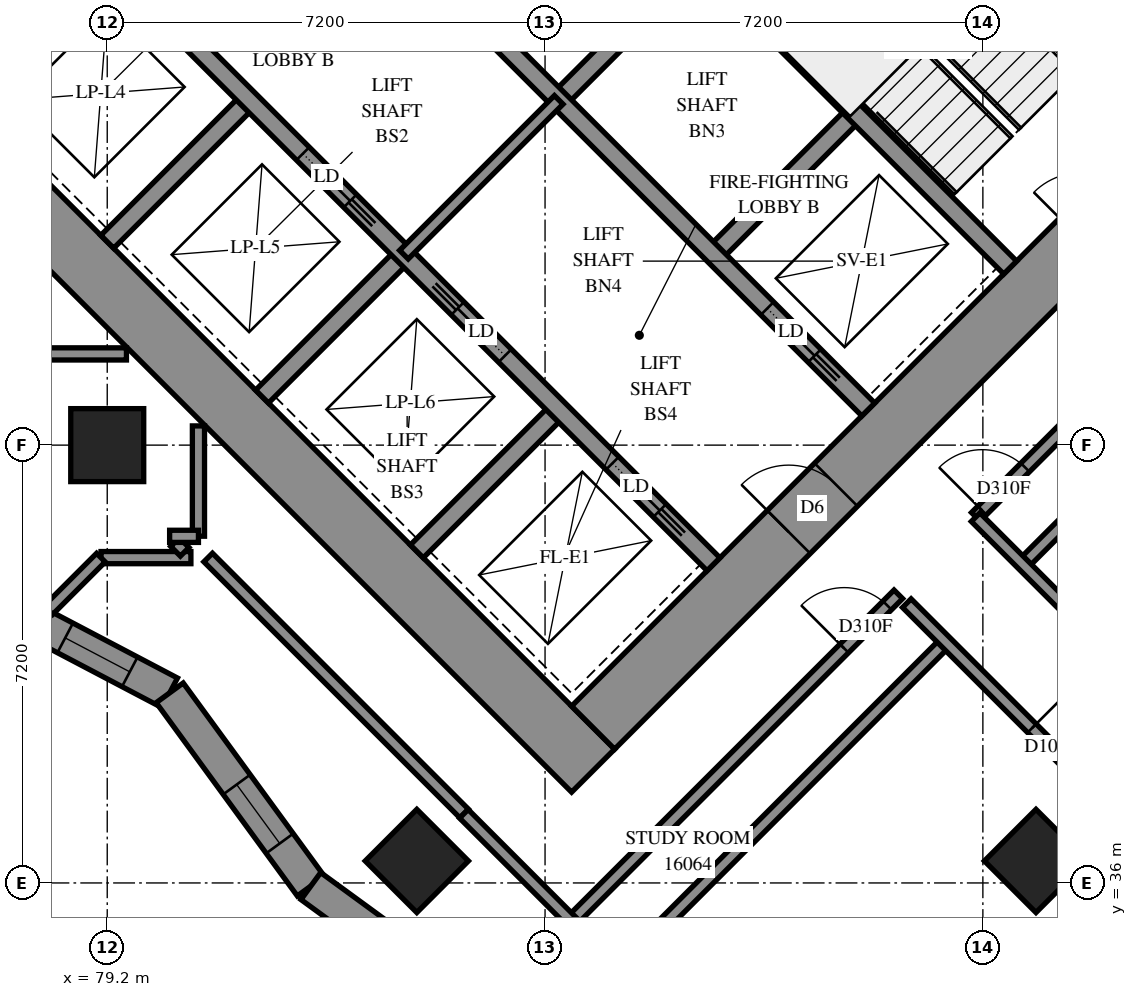
"""IFC4 building model, lengths in metres.
Left out: names, types, materials, properties, quantities, classifications, styles, units other than length and angle.
Written with IfcOpenShell. Run it as: python <this file> out.ifc"""

import sys

from ifc_helpers import new_model, si_unit, direction, frame, frame_2d, origin, origin_2d, place, context, subcontext, project, spatial, polyline, rectangle, outline, extrude, element, fill, save


model = new_model("IFC4")
c1 = context("Model", 3, precision=1e-05, world=origin(), true_north=direction((0.0, 1.0)))
c2 = subcontext(c1, "Body", "Model", "MODEL_VIEW")
j1 = project(units=[si_unit("LENGTHUNIT", "METRE"), si_unit("PLANEANGLEUNIT", "RADIAN")], contexts=[c1])
p1 = place(None, origin())
s1 = spatial("IfcSite", under=j1, at=p1, CompositionType="ELEMENT")
p2 = place(p1, origin())
s2 = spatial("IfcBuilding", under=s1, at=p2, CompositionType="ELEMENT")
p3 = place(p2, frame((0.0, 0.0, 61.0)))
s3 = spatial("IfcBuildingStorey", under=s2, at=p3, CompositionType="ELEMENT", Elevation=61.0)
for number, where, z_axis, x_axis in (
    (1, (79.2, 43.2, 0.0), (0.0, 0.0, 1.0), (1.0, 0.0, 0.0)),
    (2, (84.291, 36.362, 0.0), (0.0, 0.0, 1.0), (0.707, -0.707, 0.0)),
    (3, (94.474, 36.362, 0.0), (0.0, 0.0, 1.0), (0.707, -0.707, 0.0)),
):
    element("IfcColumn", number, at=place(p3, frame(where, z_axis=z_axis, x_axis=x_axis)), inside=s3, PredefinedType="COLUMN", context=c2, shape_type="SweptSolid", body=[
        extrude(rectangle(XDim=1.2, YDim=1.2, at=origin_2d()), origin(), (0.0, 0.0, 1.0), 3.1),
    ])
p4 = place(p3, frame((75.594, 49.443, -0.3), z_axis=(0.0, 0.0, 1.0), x_axis=(0.7071037324, -0.70710983, 0.0)))
e4 = element("IfcWall", 4, at=p4, inside=s3, PredefinedType="SHEAR", context=c2, shape_type="SweptSolid", body=[
    extrude(rectangle(XDim=16.4, YDim=1.0, at=frame_2d((8.2, 0.0))), origin(), (0.0, 0.0, 1.0), 2.7),
])
p5 = place(p3, frame((86.483, 60.333, -0.3), z_axis=(0.0, 0.0, 1.0), x_axis=(0.70710983, -0.7071037324, 0.0)))
e5 = element("IfcWall", 5, at=p5, inside=s3, PredefinedType="SHEAR", context=c2, shape_type="SweptSolid", body=[
    extrude(rectangle(XDim=16.4, YDim=1.0, at=frame_2d((8.2, 0.0))), origin(), (0.0, 0.0, 1.0), 2.7),
])
p6 = place(p5, frame((11.0, 0.0, 0.3)))
e6 = element("IfcOpeningElement", 6, at=p6, cuts=e5, PredefinedType="OPENING", context=c2, shape_type="SweptSolid", body=[
    extrude(rectangle(XDim=0.8, YDim=2.1, at=frame_2d((0.4, 1.05))), frame((0.0, 0.51, 0.0), z_axis=(0.0, -1.0, 0.0), x_axis=(1.0, 0.0, 0.0)), (0.0, 0.0, 1.0), 1.02),
])
p7 = place(p3, frame((76.301, 49.443, -0.3), z_axis=(0.0, 0.0, 1.0), x_axis=(0.7071067812, 0.7071067812, 0.0)))
e7 = element("IfcWall", 7, at=p7, inside=s3, PredefinedType="SHEAR", context=c2, shape_type="SweptSolid", body=[
    extrude(rectangle(XDim=14.4, YDim=1.0, at=frame_2d((7.2, 0.0))), origin(), (0.0, 0.0, 1.0), 2.7),
])
p8 = place(p7, frame((4.55, 0.0, 0.3)))
e8 = element("IfcOpeningElement", 8, at=p8, cuts=e7, PredefinedType="OPENING", context=c2, shape_type="SweptSolid", body=[
    extrude(rectangle(XDim=1.1, YDim=2.1, at=frame_2d((0.55, 1.05))), frame((0.0, 0.51, 0.0), z_axis=(0.0, -1.0, 0.0), x_axis=(1.0, 0.0, 0.0)), (0.0, 0.0, 1.0), 1.02),
])
p9 = place(p7, frame((11.35, 0.0, 0.3)))
e9 = element("IfcOpeningElement", 9, at=p9, cuts=e7, PredefinedType="OPENING", context=c2, shape_type="SweptSolid", body=[
    extrude(rectangle(XDim=1.1, YDim=2.1, at=frame_2d((0.55, 1.05))), frame((0.0, 0.51, 0.0), z_axis=(0.0, -1.0, 0.0), x_axis=(1.0, 0.0, 0.0)), (0.0, 0.0, 1.0), 1.02),
])
p10 = place(p3, frame((87.19, 38.554, -0.3), z_axis=(0.0, 0.0, 1.0), x_axis=(0.707103309, 0.7071102534, 0.0)))
e10 = element("IfcWall", 10, at=p10, inside=s3, PredefinedType="SHEAR", context=c2, shape_type="SweptSolid", body=[
    extrude(rectangle(XDim=14.4, YDim=1.0, at=frame_2d((7.2, 0.0))), origin(), (0.0, 0.0, 1.0), 2.7),
])
p11 = place(p10, frame((4.55, 0.0, 0.3)))
e11 = element("IfcOpeningElement", 11, at=p11, cuts=e10, PredefinedType="OPENING", context=c2, shape_type="SweptSolid", body=[
    extrude(rectangle(XDim=1.1, YDim=2.1, at=frame_2d((0.55, 1.05))), frame((0.0, 0.51, 0.0), z_axis=(0.0, -1.0, 0.0), x_axis=(1.0, 0.0, 0.0)), (0.0, 0.0, 1.0), 1.02),
])
p12 = place(p10, frame((11.35, 0.0, 0.3)))
e12 = element("IfcOpeningElement", 12, at=p12, cuts=e10, PredefinedType="OPENING", context=c2, shape_type="SweptSolid", body=[
    extrude(rectangle(XDim=1.1, YDim=2.1, at=frame_2d((0.55, 1.05))), frame((0.0, 0.51, 0.0), z_axis=(0.0, -1.0, 0.0), x_axis=(1.0, 0.0, 0.0)), (0.0, 0.0, 1.0), 1.02),
])
p13 = place(p3, frame((79.2, 46.544, 0.0), z_axis=(0.0, 0.0, 1.0), x_axis=(0.7071219326, 0.7070916295, 0.0)))
e13 = element("IfcWall", 13, at=p13, inside=s3, PredefinedType="SOLIDWALL", context=c2, shape_type="SweptSolid", body=[
    extrude(rectangle(XDim=3.3, YDim=0.3, at=frame_2d((1.65, 0.0))), origin(), (0.0, 0.0, 1.0), 3.1),
])
p14 = place(p3, frame((81.746, 43.999, 0.0), z_axis=(0.0, 0.0, 1.0), x_axis=(0.7071067812, 0.7071067812, 0.0)))
e14 = element("IfcWall", 14, at=p14, inside=s3, PredefinedType="SOLIDWALL", context=c2, shape_type="SweptSolid", body=[
    extrude(rectangle(XDim=3.3, YDim=0.3, at=frame_2d((1.65, 0.0))), origin(), (0.0, 0.0, 1.0), 3.1),
])
p15 = place(p3, frame((86.625, 48.878, 0.0), z_axis=(0.0, 0.0, 1.0), x_axis=(0.7071067812, 0.7071067812, 0.0)))
e15 = element("IfcWall", 15, at=p15, inside=s3, PredefinedType="SOLIDWALL", context=c2, shape_type="SweptSolid", body=[
    extrude(rectangle(XDim=3.3, YDim=0.3, at=frame_2d((1.65, 0.0))), origin(), (0.0, 0.0, 1.0), 3.1),
])
p16 = place(p3, frame((84.291, 41.453, 0.0), z_axis=(0.0, 0.0, 1.0), x_axis=(0.7071067812, 0.7071067812, 0.0)))
e16 = element("IfcWall", 16, at=p16, inside=s3, PredefinedType="SOLIDWALL", context=c2, shape_type="SweptSolid", body=[
    extrude(rectangle(XDim=3.3, YDim=0.3, at=frame_2d((1.65, 0.0))), origin(), (0.0, 0.0, 1.0), 3.1),
])
p17 = place(p3, frame((89.17, 46.332, 0.0), z_axis=(0.0, 0.0, 1.0), x_axis=(0.7071067812, 0.7071067812, 0.0)))
e17 = element("IfcWall", 17, at=p17, inside=s3, PredefinedType="SOLIDWALL", context=c2, shape_type="SweptSolid", body=[
    extrude(rectangle(XDim=3.3, YDim=0.3, at=frame_2d((1.65, 0.0))), origin(), (0.0, 0.0, 1.0), 3.1),
])
p18 = place(p3, frame((78.988, 51.423, 0.0), z_axis=(0.0, 0.0, 1.0), x_axis=(0.7071067812, -0.7071067812, 0.0)))
e18 = element("IfcWall", 18, at=p18, inside=s3, PredefinedType="SOLIDWALL", context=c2, shape_type="SweptSolid", body=[
    extrude(rectangle(XDim=14.4, YDim=0.3, at=frame_2d((7.2, 0.0))), origin(), (0.0, 0.0, 1.0), 3.1),
])
p19 = place(p18, frame((1.25, 0.0, 0.0)))
e19 = element("IfcOpeningElement", 19, at=p19, cuts=e18, PredefinedType="OPENING", context=c2, shape_type="SweptSolid", body=[
    extrude(rectangle(XDim=1.1, YDim=2.1, at=frame_2d((0.55, 1.05))), frame((0.0, 0.16, 0.0), z_axis=(0.0, -1.0, 0.0), x_axis=(1.0, 0.0, 0.0)), (0.0, 0.0, 1.0), 0.32),
])
p20 = place(p18, frame((4.85, 0.0, 0.0)))
e20 = element("IfcOpeningElement", 20, at=p20, cuts=e18, PredefinedType="OPENING", context=c2, shape_type="SweptSolid", body=[
    extrude(rectangle(XDim=1.1, YDim=2.1, at=frame_2d((0.55, 1.05))), frame((0.0, 0.16, 0.0), z_axis=(0.0, -1.0, 0.0), x_axis=(1.0, 0.0, 0.0)), (0.0, 0.0, 1.0), 0.32),
])
p21 = place(p18, frame((8.45, 0.0, 0.0)))
e21 = element("IfcOpeningElement", 21, at=p21, cuts=e18, PredefinedType="OPENING", context=c2, shape_type="SweptSolid", body=[
    extrude(rectangle(XDim=1.1, YDim=2.1, at=frame_2d((0.55, 1.05))), frame((0.0, 0.16, 0.0), z_axis=(0.0, -1.0, 0.0), x_axis=(1.0, 0.0, 0.0)), (0.0, 0.0, 1.0), 0.32),
])
p22 = place(p18, frame((12.05, 0.0, 0.0)))
e22 = element("IfcOpeningElement", 22, at=p22, cuts=e18, PredefinedType="OPENING", context=c2, shape_type="SweptSolid", body=[
    extrude(rectangle(XDim=1.1, YDim=2.1, at=frame_2d((0.55, 1.05))), frame((0.0, 0.16, 0.0), z_axis=(0.0, -1.0, 0.0), x_axis=(1.0, 0.0, 0.0)), (0.0, 0.0, 1.0), 0.32),
])
p23 = place(p3, frame((81.534, 53.969, 0.0), z_axis=(0.0, 0.0, 1.0), x_axis=(0.707103309, -0.7071102534, 0.0)))
e23 = element("IfcWall", 23, at=p23, inside=s3, PredefinedType="SOLIDWALL", context=c2, shape_type="SweptSolid", body=[
    extrude(rectangle(XDim=14.4, YDim=0.3, at=frame_2d((7.2, 0.0))), origin(), (0.0, 0.0, 1.0), 3.1),
])
p24 = place(p23, frame((12.05, 0.0, 0.0)))
e24 = element("IfcOpeningElement", 24, at=p24, cuts=e23, PredefinedType="OPENING", context=c2, shape_type="SweptSolid", body=[
    extrude(rectangle(XDim=1.1, YDim=2.1, at=frame_2d((0.55, 1.05))), frame((0.0, 0.16, 0.0), z_axis=(0.0, -1.0, 0.0), x_axis=(1.0, 0.0, 0.0)), (0.0, 0.0, 1.0), 0.32),
])
p25 = place(p3, frame((88.958, 51.211, 0.0), z_axis=(0.0, 0.0, 1.0), x_axis=(0.7070998367, -0.7071137256, 0.0)))
e25 = element("IfcWall", 25, at=p25, inside=s3, PredefinedType="SOLIDWALL", context=c2, shape_type="SweptSolid", body=[
    extrude(rectangle(XDim=7.2, YDim=0.3, at=frame_2d((3.6, 0.0))), origin(), (0.0, 0.0, 1.0), 3.1),
])
p26 = place(p3, frame((76.568, 41.05, 0.0), z_axis=(0.0, 0.0, 1.0), x_axis=(0.8852124117, -0.4651870444, 0.0)))
e26 = element("IfcWall", 26, at=p26, inside=s3, PredefinedType="SOLIDWALL", context=c2, shape_type="SweptSolid", body=[
    extrude(outline(polyline([(0.02, -0.275), (4.07, -0.275), (4.198, 0.275), (-0.02, 0.275), (0.02, -0.275)])), origin(), (0.0, 0.0, 1.0), 3.1),
])
p27 = place(p26, frame((0.325, 0.0, 0.5)))
e27 = element("IfcOpeningElement", 27, at=p27, cuts=e26, PredefinedType="OPENING", context=c2, shape_type="SweptSolid", body=[
    extrude(rectangle(XDim=1.2, YDim=2.45, at=frame_2d((0.6, 1.225))), frame((0.0, 0.285, 0.0), z_axis=(0.0, -1.0, 0.0), x_axis=(1.0, 0.0, 0.0)), (0.0, 0.0, 1.0), 0.57),
])
p28 = place(p26, frame((2.192, 0.0, 0.5)))
e28 = element("IfcOpeningElement", 28, at=p28, cuts=e26, PredefinedType="OPENING", context=c2, shape_type="SweptSolid", body=[
    extrude(rectangle(XDim=1.2, YDim=2.45, at=frame_2d((0.6, 1.225))), frame((0.0, 0.285, 0.0), z_axis=(0.0, -1.0, 0.0), x_axis=(1.0, 0.0, 0.0)), (0.0, 0.0, 1.0), 0.57),
])
p29 = place(p3, frame((80.227, 39.127, 0.0), z_axis=(0.0, 0.0, 1.0), x_axis=(0.5897540607, -0.8075829046, 0.0)))
e29 = element("IfcWall", 29, at=p29, inside=s3, PredefinedType="SOLIDWALL", context=c2, shape_type="SweptSolid", body=[
    extrude(outline(polyline([(0.064, -0.275), (3.978, -0.275), (3.892, 0.275), (-0.064, 0.275), (0.064, -0.275)])), origin(), (0.0, 0.0, 1.0), 3.1),
])
p30 = place(p29, frame((1.868, 0.0, 0.5)))
e30 = element("IfcOpeningElement", 30, at=p30, cuts=e29, PredefinedType="OPENING", context=c2, shape_type="SweptSolid", body=[
    extrude(rectangle(XDim=1.2, YDim=2.45, at=frame_2d((0.6, 1.225))), frame((0.0, 0.285, 0.0), z_axis=(0.0, -1.0, 0.0), x_axis=(1.0, 0.0, 0.0)), (0.0, 0.0, 1.0), 0.57),
])
p31 = place(p3, frame((82.548, 35.949, 0.0), z_axis=(0.0, 0.0, 1.0), x_axis=(0.8075900138, -0.5897443257, 0.0)))
e31 = element("IfcWall", 31, at=p31, inside=s3, PredefinedType="SOLIDWALL", context=c2, shape_type="SweptSolid", body=[
    extrude(outline(polyline([(-0.043, -0.275), (3.871, -0.275), (3.957, 0.275), (0.043, 0.275), (-0.043, -0.275)])), origin(), (0.0, 0.0, 1.0), 3.1),
])
p32 = place(p31, frame((1.733, 0.0, 0.5)))
e32 = element("IfcOpeningElement", 32, at=p32, cuts=e31, PredefinedType="OPENING", context=c2, shape_type="SweptSolid", body=[
    extrude(rectangle(XDim=1.2, YDim=2.45, at=frame_2d((0.6, 1.225))), frame((0.0, 0.285, 0.0), z_axis=(0.0, -1.0, 0.0), x_axis=(1.0, 0.0, 0.0)), (0.0, 0.0, 1.0), 0.57),
])
p33 = place(p3, frame((91.313, 53.354, 0.0), z_axis=(0.0, 0.0, 1.0), x_axis=(0.7071067812, -0.7071067812, 0.0)))
e33 = element("IfcWall", 33, at=p33, inside=s3, PredefinedType="PARTITIONING", context=c2, shape_type="SweptSolid", body=[
    extrude(rectangle(XDim=5.65, YDim=0.15, at=frame_2d((2.825, 0.0))), origin(), (0.0, 0.0, 1.0), 3.1),
])
p34 = place(p3, frame((84.079, 46.332, 0.0), z_axis=(0.0, 0.0, 1.0), x_axis=(0.7071067812, 0.7071067812, 0.0)))
e34 = element("IfcWall", 34, at=p34, inside=s3, PredefinedType="PARTITIONING", context=c2, shape_type="SweptSolid", body=[
    extrude(rectangle(XDim=3.6, YDim=0.2, at=frame_2d((1.8, 0.0))), origin(), (0.0, 0.0, 1.0), 3.1),
])
p35 = place(p3, frame((94.259, 41.243, 0.0), z_axis=(0.0, 0.0, 1.0), x_axis=(0.7070205168, 0.707193035, 0.0)))
e35 = element("IfcWall", 35, at=p35, inside=s3, PredefinedType="PARTITIONING", context=c2, shape_type="SweptSolid", body=[
    extrude(rectangle(XDim=12.173, YDim=0.2, at=frame_2d((6.086, 0.0))), origin(), (0.0, 0.0, 1.0), 3.1),
])
p36 = place(p3, frame((93.484, 42.02, 0.0), z_axis=(0.0, 0.0, 1.0), x_axis=(0.7071067812, 0.7071067812, 0.0)))
e36 = element("IfcWall", 36, at=p36, inside=s3, PredefinedType="PARTITIONING", context=c2, shape_type="SweptSolid", body=[
    extrude(rectangle(XDim=9.998, YDim=0.2, at=frame_2d((4.999, 0.0))), origin(), (0.0, 0.0, 1.0), 3.1),
])
p37 = place(p36, frame((0.148, 0.0, 0.0)))
e37 = element("IfcOpeningElement", 37, at=p37, cuts=e36, PredefinedType="OPENING", context=c2, shape_type="SweptSolid", body=[
    extrude(rectangle(XDim=1.0, YDim=2.1, at=frame_2d((0.5, 1.05))), frame((0.0, 0.11, 0.0), z_axis=(0.0, -1.0, 0.0), x_axis=(1.0, 0.0, 0.0)), (0.0, 0.0, 1.0), 0.22),
])
p38 = place(p3, frame((86.311, 33.282, 0.0), z_axis=(0.0, 0.0, 1.0), x_axis=(0.7069956462, 0.7072178987, 0.0)))
e38 = element("IfcWall", 38, at=p38, inside=s3, PredefinedType="PARTITIONING", context=c2, shape_type="SweptSolid", body=[
    extrude(rectangle(XDim=9.449, YDim=0.2, at=frame_2d((4.724, 0.0))), origin(), (0.0, 0.0, 1.0), 3.1),
])
p39 = place(p3, frame((92.349, 40.601, 0.0), z_axis=(0.0, 0.0, 1.0), x_axis=(0.7071067812, -0.7071067812, 0.0)))
e39 = element("IfcWall", 39, at=p39, inside=s3, PredefinedType="PARTITIONING", context=c2, shape_type="SweptSolid", body=[
    extrude(rectangle(XDim=8.101, YDim=0.2, at=frame_2d((4.05, 0.0))), origin(), (0.0, 0.0, 1.0), 3.1),
])
p40 = place(p39, frame((2.909, 0.0, 0.0)))
e40 = element("IfcOpeningElement", 40, at=p40, cuts=e39, PredefinedType="OPENING", context=c2, shape_type="SweptSolid", body=[
    extrude(rectangle(XDim=0.9, YDim=2.1, at=frame_2d((0.45, 1.05))), frame((0.0, 0.11, 0.0), z_axis=(0.0, -1.0, 0.0), x_axis=(1.0, 0.0, 0.0)), (0.0, 0.0, 1.0), 0.22),
])
p41 = place(p3, frame((86.836, 35.372, 0.0), z_axis=(0.0, 0.0, 1.0), x_axis=(0.7071067812, 0.7071067812, 0.0)))
e41 = element("IfcWall", 41, at=p41, inside=s3, PredefinedType="PARTITIONING", context=c2, shape_type="SweptSolid", body=[
    extrude(rectangle(XDim=7.6, YDim=0.2, at=frame_2d((3.8, 0.0))), origin(), (0.0, 0.0, 1.0), 3.1),
])
p42 = place(p41, frame((6.342, 0.0, 0.0)))
e42 = element("IfcOpeningElement", 42, at=p42, cuts=e41, PredefinedType="OPENING", context=c2, shape_type="SweptSolid", body=[
    extrude(rectangle(XDim=1.0, YDim=2.1, at=frame_2d((0.5, 1.05))), frame((0.0, 0.11, 0.0), z_axis=(0.0, -1.0, 0.0), x_axis=(1.0, 0.0, 0.0)), (0.0, 0.0, 1.0), 0.22),
])
p43 = place(p3, frame((85.07, 37.142, 0.0), z_axis=(0.0, 0.0, 1.0), x_axis=(-0.7070899851, 0.7071235769, 0.0)))
e43 = element("IfcWall", 43, at=p43, inside=s3, PredefinedType="PARTITIONING", context=c2, shape_type="SweptSolid", body=[
    extrude(rectangle(XDim=5.954, YDim=0.2, at=frame_2d((2.977, 0.0))), origin(), (0.0, 0.0, 1.0), 3.1),
])
p44 = place(p3, frame((93.481, 42.015, 0.0), z_axis=(0.0, 0.0, 1.0), x_axis=(0.7071067812, -0.7071067812, 0.0)))
e44 = element("IfcWall", 44, at=p44, inside=s3, PredefinedType="PARTITIONING", context=c2, shape_type="SweptSolid", body=[
    extrude(rectangle(XDim=4.698, YDim=0.2, at=frame_2d((2.349, 0.0))), origin(), (0.0, 0.0, 1.0), 3.1),
])
p45 = place(p44, frame((3.452, 0.0, 0.0)))
e45 = element("IfcOpeningElement", 45, at=p45, cuts=e44, PredefinedType="OPENING", context=c2, shape_type="SweptSolid", body=[
    extrude(rectangle(XDim=0.9, YDim=2.1, at=frame_2d((0.45, 1.05))), frame((0.0, 0.11, 0.0), z_axis=(0.0, -1.0, 0.0), x_axis=(1.0, 0.0, 0.0)), (0.0, 0.0, 1.0), 0.22),
])
p46 = place(p3, frame((85.065, 37.137, 0.0), z_axis=(0.0, 0.0, 1.0), x_axis=(0.7071067812, -0.7071067812, 0.0)))
e46 = element("IfcWall", 46, at=p46, inside=s3, PredefinedType="PARTITIONING", context=c2, shape_type="SweptSolid", body=[
    extrude(rectangle(XDim=2.5, YDim=0.2, at=frame_2d((1.25, 0.0))), origin(), (0.0, 0.0, 1.0), 3.1),
])
for number, where, z_axis, x_axis in (
    (47, (77.702, 44.7, 0.0), (0.0, 0.0, 1.0), (1.0, 0.0, 0.0)),
    (48, (80.7, 41.702, 0.0), (0.0, 0.0, 1.0), (0.0, 1.0, 0.0)),
):
    element("IfcWall", number, at=place(p3, frame(where, z_axis=z_axis, x_axis=x_axis)), inside=s3, PredefinedType="PARTITIONING", context=c2, shape_type="SweptSolid", body=[
        extrude(rectangle(XDim=1.814, YDim=0.2, at=frame_2d((0.907, 0.0))), origin(), (0.0, 0.0, 1.0), 3.1),
    ])
p47 = place(p3, frame((79.098, 41.35, 0.0), z_axis=(0.0, 0.0, 1.0), x_axis=(1.0, 0.0, 0.0)))
e49 = element("IfcWall", 49, at=p47, inside=s3, PredefinedType="PARTITIONING", context=c2, shape_type="SweptSolid", body=[
    extrude(rectangle(XDim=1.478, YDim=0.2, at=frame_2d((0.739, 0.0))), origin(), (0.0, 0.0, 1.0), 3.1),
])
p48 = place(p3, frame((78.231, 40.486, 0.0), z_axis=(0.0, 0.0, 1.0), x_axis=(0.7071067812, 0.7071067812, 0.0)))
e50 = element("IfcWall", 50, at=p48, inside=s3, PredefinedType="PARTITIONING", context=c2, shape_type="SweptSolid", body=[
    extrude(rectangle(XDim=1.222, YDim=0.2, at=frame_2d((0.611, 0.0))), origin(), (0.0, 0.0, 1.0), 3.1),
])
p49 = place(p3, frame((80.315, 41.605, 0.0), z_axis=(0.0, 0.0, 1.0), x_axis=(0.7071067812, -0.7071067812, 0.0)))
e51 = element("IfcWall", 51, at=p49, inside=s3, PredefinedType="PARTITIONING", context=c2, shape_type="SweptSolid", body=[
    extrude(rectangle(XDim=0.225, YDim=0.2, at=frame_2d((0.113, 0.0))), origin(), (0.0, 0.0, 1.0), 3.1),
])
p50 = place(p3, frame((80.226, 41.7, 0.0), z_axis=(0.0, 0.0, 1.0), x_axis=(1.0, 0.0, 0.0)))
e52 = element("IfcWall", 52, at=p50, inside=s3, PredefinedType="PARTITIONING", context=c2, shape_type="SweptSolid", body=[
    extrude(rectangle(XDim=0.474, YDim=0.2, at=frame_2d((0.237, 0.0))), origin(), (0.0, 0.0, 1.0), 3.1),
])
p51 = place(p28, origin())
e53 = element("IfcWindow", 53, at=p51, inside=s3, PartitioningType="SINGLE_PANEL", PredefinedType="WINDOW", context=c2, shape_type="SweptSolid", body=[
    extrude(rectangle(XDim=1.2, YDim=2.45, at=frame_2d((0.6, 1.225))), frame((0.0, 0.155, 0.0), z_axis=(0.0, -1.0, 0.0), x_axis=(1.0, 0.0, 0.0)), (0.0, 0.0, 1.0), 0.06),
])
fill(e28, e53)
p52 = place(p30, origin())
e54 = element("IfcWindow", 54, at=p52, inside=s3, PartitioningType="SINGLE_PANEL", PredefinedType="WINDOW", context=c2, shape_type="SweptSolid", body=[
    extrude(rectangle(XDim=1.2, YDim=2.45, at=frame_2d((0.6, 1.225))), frame((0.0, 0.155, 0.0), z_axis=(0.0, -1.0, 0.0), x_axis=(1.0, 0.0, 0.0)), (0.0, 0.0, 1.0), 0.06),
])
fill(e30, e54)
p53 = place(p11, origin())
e55 = element("IfcDoor", 55, at=p53, inside=s3, OperationType="DOUBLE_DOOR_SINGLE_SWING", PredefinedType="DOOR", context=c2, shape_type="SweptSolid", body=[
    extrude(rectangle(XDim=1.1, YDim=2.1, at=frame_2d((0.55, 1.05))), frame((0.0, 0.025, 0.0), z_axis=(0.0, -1.0, 0.0), x_axis=(1.0, 0.0, 0.0)), (0.0, 0.0, 1.0), 0.05),
])
fill(e11, e55)
p54 = place(p20, origin())
e56 = element("IfcDoor", 56, at=p54, inside=s3, OperationType="SLIDING_TO_RIGHT", PredefinedType="DOOR", context=c2, shape_type="SweptSolid", body=[
    extrude(rectangle(XDim=1.1, YDim=2.1, at=frame_2d((0.55, 1.05))), frame((0.0, 0.025, 0.0), z_axis=(0.0, -1.0, 0.0), x_axis=(1.0, 0.0, 0.0)), (0.0, 0.0, 1.0), 0.05),
])
fill(e20, e56)
p55 = place(p21, origin())
e57 = element("IfcDoor", 57, at=p55, inside=s3, OperationType="SLIDING_TO_LEFT", PredefinedType="DOOR", context=c2, shape_type="SweptSolid", body=[
    extrude(rectangle(XDim=1.1, YDim=2.1, at=frame_2d((0.55, 1.05))), frame((0.0, 0.025, 0.0), z_axis=(0.0, -1.0, 0.0), x_axis=(1.0, 0.0, 0.0)), (0.0, 0.0, 1.0), 0.05),
])
fill(e21, e57)
p56 = place(p22, origin())
e58 = element("IfcDoor", 58, at=p56, inside=s3, OperationType="SLIDING_TO_RIGHT", PredefinedType="DOOR", context=c2, shape_type="SweptSolid", body=[
    extrude(rectangle(XDim=1.1, YDim=2.1, at=frame_2d((0.55, 1.05))), frame((0.0, 0.025, 0.0), z_axis=(0.0, -1.0, 0.0), x_axis=(1.0, 0.0, 0.0)), (0.0, 0.0, 1.0), 0.05),
])
fill(e22, e58)
p57 = place(p24, origin())
e59 = element("IfcDoor", 59, at=p57, inside=s3, OperationType="SLIDING_TO_RIGHT", PredefinedType="DOOR", context=c2, shape_type="SweptSolid", body=[
    extrude(rectangle(XDim=1.1, YDim=2.1, at=frame_2d((0.55, 1.05))), frame((0.0, 0.025, 0.0), z_axis=(0.0, -1.0, 0.0), x_axis=(1.0, 0.0, 0.0)), (0.0, 0.0, 1.0), 0.05),
])
fill(e24, e59)
p58 = place(p37, origin())
e60 = element("IfcDoor", 60, at=p58, inside=s3, OperationType="SINGLE_SWING_LEFT", PredefinedType="DOOR", context=c2, shape_type="SweptSolid", body=[
    extrude(rectangle(XDim=1.0, YDim=2.1, at=frame_2d((0.5, 1.05))), frame((0.0, 0.025, 0.0), z_axis=(0.0, -1.0, 0.0), x_axis=(1.0, 0.0, 0.0)), (0.0, 0.0, 1.0), 0.05),
])
fill(e37, e60)
p59 = place(p42, origin())
e61 = element("IfcDoor", 61, at=p59, inside=s3, OperationType="SINGLE_SWING_RIGHT", PredefinedType="DOOR", context=c2, shape_type="SweptSolid", body=[
    extrude(rectangle(XDim=1.0, YDim=2.1, at=frame_2d((0.5, 1.05))), frame((0.0, 0.025, 0.0), z_axis=(0.0, -1.0, 0.0), x_axis=(1.0, 0.0, 0.0)), (0.0, 0.0, 1.0), 0.05),
])
fill(e42, e61)
p60 = place(p40, origin())
e62 = element("IfcDoor", 62, at=p60, inside=s3, OperationType="SINGLE_SWING_LEFT", PredefinedType="DOOR", context=c2, shape_type="SweptSolid", body=[
    extrude(rectangle(XDim=0.9, YDim=2.1, at=frame_2d((0.45, 1.05))), frame((0.0, 0.025, 0.0), z_axis=(0.0, -1.0, 0.0), x_axis=(1.0, 0.0, 0.0)), (0.0, 0.0, 1.0), 0.05),
])
fill(e40, e62)
save(model, sys.argv[1])
